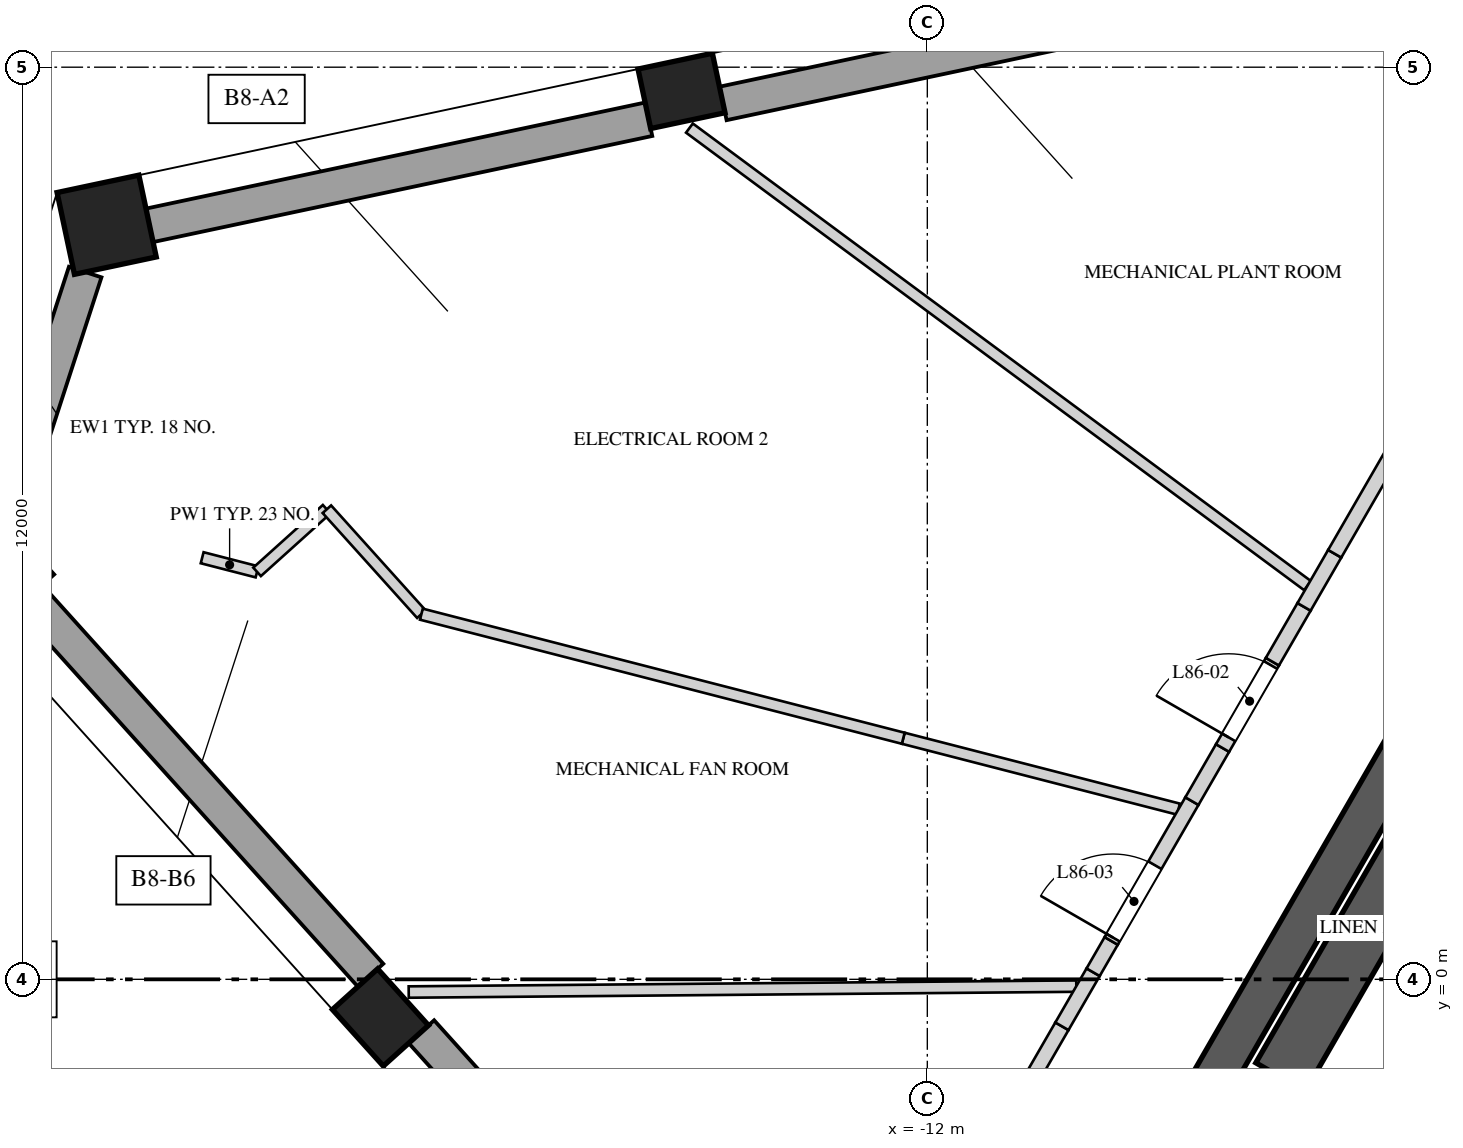
"""IFC4 building model, lengths in metres.
Left out: names, types, materials, properties, quantities, classifications, styles, units other than length and angle.
Written with IfcOpenShell. Run it as: python <this file> out.ifc"""

import sys

from ifc_helpers import new_model, si_unit, direction, frame, frame_2d, origin, origin_2d, place, context, subcontext, project, spatial, polyline, rectangle, outline, extrude, element, fill, save


model = new_model("IFC4")
c1 = context("Model", 3, precision=1e-05, world=origin(), true_north=direction((0.0, 1.0)))
c2 = subcontext(c1, "Body", "Model", "MODEL_VIEW")
j1 = project(units=[si_unit("LENGTHUNIT", "METRE"), si_unit("PLANEANGLEUNIT", "RADIAN")], contexts=[c1])
p1 = place(None, origin())
s1 = spatial("IfcSite", under=j1, at=p1, CompositionType="ELEMENT")
p2 = place(p1, origin())
s2 = spatial("IfcBuilding", under=s1, at=p2, CompositionType="ELEMENT")
p3 = place(p2, frame((0.0, 0.0, 374.9)))
s3 = spatial("IfcBuildingStorey", under=s2, at=p3, CompositionType="ELEMENT", Elevation=374.9)
p4 = place(p3, frame((-1.285, 10.725, 0.0), z_axis=(0.0, 0.0, 1.0), x_axis=(-0.499994590896, -0.86602852671, 0.0)))
e1 = element("IfcWall", 1, at=p4, inside=s3, PredefinedType="SHEAR", context=c2, shape_type="SweptSolid", body=[
    extrude(rectangle(XDim=17.292, YDim=0.55, at=frame_2d((8.646, 0.0))), origin(), (0.0, 0.0, 1.0), 6.0),
])
p5 = place(p4, frame((6.851, 0.0, 0.0)))
e2 = element("IfcOpeningElement", 2, at=p5, cuts=e1, PredefinedType="OPENING", context=c2, shape_type="SweptSolid", body=[
    extrude(rectangle(XDim=1.0, YDim=2.4, at=frame_2d((0.5, 1.2))), frame((0.0, 0.285, 0.0), z_axis=(0.0, -1.0, 0.0), x_axis=(1.0, 0.0, 0.0)), (0.0, 0.0, 1.0), 0.57),
])
p6 = place(p4, frame((15.089, 0.0, 0.0)))
e3 = element("IfcOpeningElement", 3, at=p6, cuts=e1, PredefinedType="OPENING", context=c2, shape_type="SweptSolid", body=[
    extrude(rectangle(XDim=0.8, YDim=2.1, at=frame_2d((0.4, 1.05))), frame((0.0, 0.285, 0.0), z_axis=(0.0, -1.0, 0.0), x_axis=(1.0, 0.0, 0.0)), (0.0, 0.0, 1.0), 0.57),
])
p7 = place(p3, frame((-24.278, 5.368, 0.0), z_axis=(0.0, 0.0, 1.0), x_axis=(0.669130606359, -0.743144825477, 0.0)))
e4 = element("IfcColumn", 4, at=p7, inside=s3, PredefinedType="COLUMN", context=c2, shape_type="SweptSolid", body=[
    extrude(rectangle(XDim=1.1, YDim=1.1, at=origin_2d()), origin(), (0.0, 0.0, 1.0), 6.0),
])
for number, where, z_axis, x_axis in (
    (5, (-19.195, -0.502, 0.0), (0.0, 0.0, 1.0), (0.669, -0.743, 0.0)),
    (6, (-15.234, 11.688, 0.0), (0.0, 0.0, 1.0), (-0.978, -0.208, 0.0)),
):
    element("IfcColumn", number, at=place(p3, frame(where, z_axis=z_axis, x_axis=x_axis)), inside=s3, PredefinedType="COLUMN", context=c2, shape_type="SweptSolid", body=[
        extrude(rectangle(XDim=1.0, YDim=0.8, at=origin_2d()), origin(), (0.0, 0.0, 1.0), 6.0),
    ])
p8 = place(p3, frame((-22.797, 9.927, 0.0), z_axis=(0.0, 0.0, 1.0), x_axis=(-0.978147600734, -0.207911690818, 0.0)))
e7 = element("IfcColumn", 7, at=p8, inside=s3, PredefinedType="COLUMN", context=c2, shape_type="SweptSolid", body=[
    extrude(rectangle(XDim=1.1, YDim=1.1, at=origin_2d()), origin(), (0.0, 0.0, 1.0), 6.0),
])
p9 = place(p3, frame((-23.079, 9.305, 0.0), z_axis=(0.0, 0.0, 1.0), x_axis=(-0.309076430482, -0.95103720228, 0.0)))
e8 = element("IfcWall", 8, at=p9, inside=s3, PredefinedType="SOLIDWALL", context=c2, shape_type="SweptSolid", body=[
    extrude(rectangle(XDim=3.435, YDim=0.45, at=frame_2d((1.718, 0.0))), origin(), (0.0, 0.0, 1.0), 5.3),
])
p10 = place(p3, frame((-23.817, 5.043, 0.0), z_axis=(0.0, 0.0, 1.0), x_axis=(0.669137493687, -0.743138624041, 0.0)))
e9 = element("IfcWall", 9, at=p10, inside=s3, PredefinedType="SOLIDWALL", context=c2, shape_type="SweptSolid", body=[
    extrude(rectangle(XDim=6.714, YDim=0.45, at=frame_2d((3.357, 0.0))), origin(), (0.0, 0.0, 1.0), 5.3),
])
p11 = place(p3, frame((-18.656, -0.689, 0.0), z_axis=(0.0, 0.0, 1.0), x_axis=(0.669117789535, -0.743156365598, 0.0)))
e10 = element("IfcWall", 10, at=p11, inside=s3, PredefinedType="SOLIDWALL", context=c2, shape_type="SweptSolid", body=[
    extrude(rectangle(XDim=7.314, YDim=0.45, at=frame_2d((3.657, 0.0))), origin(), (0.0, 0.0, 1.0), 5.3),
])
p12 = place(p3, frame((-15.666, 11.315, 0.0), z_axis=(0.0, 0.0, 1.0), x_axis=(-0.978144338977, -0.207927035587, 0.0)))
e11 = element("IfcWall", 11, at=p12, inside=s3, PredefinedType="SOLIDWALL", context=c2, shape_type="SweptSolid", body=[
    extrude(rectangle(XDim=6.714, YDim=0.45, at=frame_2d((3.357, 0.0))), origin(), (0.0, 0.0, 1.0), 5.3),
])
p13 = place(p3, frame((-7.533, 13.044, 0.0), z_axis=(0.0, 0.0, 1.0), x_axis=(-0.978151299843, -0.207894287118, 0.0)))
e12 = element("IfcWall", 12, at=p13, inside=s3, PredefinedType="SOLIDWALL", context=c2, shape_type="SweptSolid", body=[
    extrude(rectangle(XDim=7.314, YDim=0.45, at=frame_2d((3.657, 0.0))), origin(), (0.0, 0.0, 1.0), 5.3),
])
p14 = place(p3, frame((-4.603, 3.477, 0.0), z_axis=(0.0, 0.0, 1.0), x_axis=(-0.500015767406, -0.866016300277, 0.0)))
e13 = element("IfcWall", 13, at=p14, inside=s3, PredefinedType="SOLIDWALL", context=c2, shape_type="SweptSolid", body=[
    extrude(rectangle(XDim=5.5, YDim=0.75, at=frame_2d((2.75, 0.0))), origin(), (0.0, 0.0, 1.0), 5.65),
])
p15 = place(p3, frame((-20.818, 5.361, 0.0), z_axis=(0.0, 0.0, 1.0), x_axis=(-0.968404914067, 0.24938308365, 0.0)))
e14 = element("IfcWall", 14, at=p15, inside=s3, PredefinedType="PARTITIONING", context=c2, shape_type="SweptSolid", body=[
    extrude(rectangle(XDim=0.746, YDim=0.15, at=frame_2d((0.373, 0.0))), origin(), (0.0, 0.0, 1.0), 5.65),
])
p16 = place(p3, frame((-19.902, 6.185, 0.0), z_axis=(0.0, 0.0, 1.0), x_axis=(-0.74319559291, -0.669074219111, 0.0)))
e15 = element("IfcWall", 15, at=p16, inside=s3, PredefinedType="PARTITIONING", context=c2, shape_type="SweptSolid", body=[
    extrude(rectangle(XDim=1.232, YDim=0.15, at=frame_2d((0.616, 0.0))), origin(), (0.0, 0.0, 1.0), 5.65),
])
p17 = place(p3, frame((-18.656, 4.804, 0.0), z_axis=(0.0, 0.0, 1.0), x_axis=(-0.669080876775, 0.743189599183, 0.0)))
e16 = element("IfcWall", 16, at=p17, inside=s3, PredefinedType="PARTITIONING", context=c2, shape_type="SweptSolid", body=[
    extrude(rectangle(XDim=1.858, YDim=0.15, at=frame_2d((0.929, 0.0))), origin(), (0.0, 0.0, 1.0), 5.65),
])
p18 = place(p3, frame((-10.04, -0.089, 0.0), z_axis=(0.0, 0.0, 1.0), x_axis=(-0.999960441248, -0.00889471414, 0.0)))
e17 = element("IfcWall", 17, at=p18, inside=s3, PredefinedType="PARTITIONING", context=c2, shape_type="SweptSolid", body=[
    extrude(rectangle(XDim=8.783, YDim=0.15, at=frame_2d((4.392, 0.0))), origin(), (0.0, 0.0, 1.0), 4.95),
])
p19 = place(p3, frame((-8.696, 2.239, 0.0), z_axis=(0.0, 0.0, 1.0), x_axis=(-0.968413242645, 0.249350739864, 0.0)))
e18 = element("IfcWall", 18, at=p19, inside=s3, PredefinedType="PARTITIONING", context=c2, shape_type="SweptSolid", body=[
    extrude(rectangle(XDim=3.739, YDim=0.15, at=frame_2d((1.87, 0.0))), origin(), (0.0, 0.0, 1.0), 4.55),
])
p20 = place(p3, frame((-12.317, 3.171, 0.0), z_axis=(0.0, 0.0, 1.0), x_axis=(-0.9684026585, 0.249391842309, 0.0)))
e19 = element("IfcWall", 19, at=p20, inside=s3, PredefinedType="PARTITIONING", context=c2, shape_type="SweptSolid", body=[
    extrude(rectangle(XDim=6.546, YDim=0.15, at=frame_2d((3.273, 0.0))), origin(), (0.0, 0.0, 1.0), 5.65),
])
p21 = place(p3, frame((-6.998, 5.18, 0.0), z_axis=(0.0, 0.0, 1.0), x_axis=(-0.803760198744, 0.594953395582, 0.0)))
e20 = element("IfcWall", 20, at=p21, inside=s3, PredefinedType="PARTITIONING", context=c2, shape_type="SweptSolid", body=[
    extrude(rectangle(XDim=10.117, YDim=0.15, at=frame_2d((5.059, 0.0))), origin(), (0.0, 0.0, 1.0), 4.75),
])
p22 = place(p3, frame((-12.326, -4.25, 0.0), z_axis=(0.0, 0.0, 1.0), x_axis=(0.499982771656, 0.866035350345, 0.0)))
e21 = element("IfcWall", 21, at=p22, inside=s3, PredefinedType="SOLIDWALL", context=c2, shape_type="SweptSolid", body=[
    extrude(rectangle(XDim=4.195, YDim=0.2, at=frame_2d((2.097, 0.0))), origin(), (0.0, 0.0, 1.0), 5.65),
])
p23 = place(p3, frame((-10.229, -0.617, 0.0), z_axis=(0.0, 0.0, 1.0), x_axis=(0.5001686003, 0.865928040471, 0.0)))
e22 = element("IfcWall", 22, at=p23, inside=s3, PredefinedType="SOLIDWALL", context=c2, shape_type="SweptSolid", body=[
    extrude(rectangle(XDim=0.821, YDim=0.2, at=frame_2d((0.411, 0.0))), origin(), (0.0, 0.0, 1.0), 4.95),
])
p24 = place(p3, frame((-9.819, 0.094, 0.0), z_axis=(0.0, 0.0, 1.0), x_axis=(0.500003887042, 0.866023159588, 0.0)))
e23 = element("IfcWall", 23, at=p24, inside=s3, PredefinedType="SOLIDWALL", context=c2, shape_type="SweptSolid", body=[
    extrude(rectangle(XDim=0.476, YDim=0.2, at=frame_2d((0.238, 0.0))), origin(), (0.0, 0.0, 1.0), 5.65),
])
p25 = place(p3, frame((-9.581, 0.505, 0.0), z_axis=(0.0, 0.0, 1.0), x_axis=(0.499984515995, 0.866034343295, 0.0)))
e24 = element("IfcWall", 24, at=p25, inside=s3, PredefinedType="SOLIDWALL", context=c2, shape_type="SweptSolid", body=[
    extrude(outline(polyline([(0.0, 0.0), (2.124, 0.0), (2.124, 4.55), (1.18, 4.55), (1.18, 5.65), (0.0, 5.65), (0.0, 0.0)])), frame((0.0, 0.1, 0.0), z_axis=(0.0, -1.0, 0.0), x_axis=(1.0, 0.0, 0.0)), (0.0, 0.0, 1.0), 0.2),
])
p26 = place(p25, frame((0.05, 0.0, 0.0)))
e25 = element("IfcOpeningElement", 25, at=p26, cuts=e24, PredefinedType="OPENING", context=c2, shape_type="SweptSolid", body=[
    extrude(rectangle(XDim=1.1, YDim=2.4, at=frame_2d((0.55, 1.2))), frame((0.0, 0.11, 0.0), z_axis=(0.0, -1.0, 0.0), x_axis=(1.0, 0.0, 0.0)), (0.0, 0.0, 1.0), 0.22),
])
p27 = place(p3, frame((-8.519, 2.344, 0.0), z_axis=(0.0, 0.0, 1.0), x_axis=(0.499914554297, 0.866074730264, 0.0)))
e26 = element("IfcWall", 26, at=p27, inside=s3, PredefinedType="SOLIDWALL", context=c2, shape_type="SweptSolid", body=[
    extrude(rectangle(XDim=0.807, YDim=0.2, at=frame_2d((0.403, 0.0))), origin(), (0.0, 0.0, 1.0), 5.65),
])
p28 = place(p3, frame((-8.116, 3.043, 0.0), z_axis=(0.0, 0.0, 1.0), x_axis=(0.500023253097, 0.866011978186, 0.0)))
e27 = element("IfcWall", 27, at=p28, inside=s3, PredefinedType="SOLIDWALL", context=c2, shape_type="SweptSolid", body=[
    extrude(outline(polyline([(0.0, 0.0), (1.312, 0.0), (1.311, 5.65), (0.906, 5.65), (0.906, 4.55), (0.0, 4.55), (0.0, 0.0)])), frame((0.0, 0.1, 0.0), z_axis=(0.0, -1.0, 0.0), x_axis=(1.0, 0.0, 0.0)), (0.0, 0.0, 1.0), 0.2),
])
p29 = place(p28, frame((0.161, 0.0, 0.0)))
e28 = element("IfcOpeningElement", 28, at=p29, cuts=e27, PredefinedType="OPENING", context=c2, shape_type="SweptSolid", body=[
    extrude(rectangle(XDim=1.1, YDim=2.4, at=frame_2d((0.55, 1.2))), frame((0.0, 0.11, 0.0), z_axis=(0.0, -1.0, 0.0), x_axis=(1.0, 0.0, 0.0)), (0.0, 0.0, 1.0), 0.22),
])
p30 = place(p3, frame((-7.46, 4.179, 0.0), z_axis=(0.0, 0.0, 1.0), x_axis=(0.499891655525, 0.866087947461, 0.0)))
e29 = element("IfcWall", 29, at=p30, inside=s3, PredefinedType="SOLIDWALL", context=c2, shape_type="SweptSolid", body=[
    extrude(rectangle(XDim=0.833, YDim=0.2, at=frame_2d((0.417, 0.0))), origin(), (0.0, 0.0, 1.0), 5.65),
])
p31 = place(p3, frame((-7.044, 4.9, 0.0), z_axis=(0.0, 0.0, 1.0), x_axis=(0.500141487433, 0.865943700565, 0.0)))
e30 = element("IfcWall", 30, at=p31, inside=s3, PredefinedType="SOLIDWALL", context=c2, shape_type="SweptSolid", body=[
    extrude(rectangle(XDim=0.807, YDim=0.2, at=frame_2d((0.403, 0.0))), origin(), (0.0, 0.0, 1.0), 4.75),
])
p32 = place(p3, frame((-6.64, 5.599, 0.0), z_axis=(0.0, 0.0, 1.0), x_axis=(0.49996417229, 0.866046087934, 0.0)))
e31 = element("IfcWall", 31, at=p32, inside=s3, PredefinedType="SOLIDWALL", context=c2, shape_type="SweptSolid", body=[
    extrude(rectangle(XDim=3.206, YDim=0.2, at=frame_2d((1.603, 0.0))), origin(), (0.0, 0.0, 1.0), 5.65),
])
p33 = place(p29, origin())
e32 = element("IfcDoor", 32, at=p33, inside=s3, OperationType="SINGLE_SWING_LEFT", PredefinedType="DOOR", context=c2, shape_type="SweptSolid", body=[
    extrude(rectangle(XDim=1.1, YDim=2.4, at=frame_2d((0.55, 1.2))), frame((0.0, 0.025, 0.0), z_axis=(0.0, -1.0, 0.0), x_axis=(1.0, 0.0, 0.0)), (0.0, 0.0, 1.0), 0.05),
])
fill(e28, e32)
p34 = place(p26, origin())
e33 = element("IfcDoor", 33, at=p34, inside=s3, OperationType="SINGLE_SWING_RIGHT", PredefinedType="DOOR", context=c2, shape_type="SweptSolid", body=[
    extrude(rectangle(XDim=1.1, YDim=2.4, at=frame_2d((0.55, 1.2))), frame((0.0, 0.025, 0.0), z_axis=(0.0, -1.0, 0.0), x_axis=(1.0, 0.0, 0.0)), (0.0, 0.0, 1.0), 0.05),
])
fill(e25, e33)
save(model, sys.argv[1])
